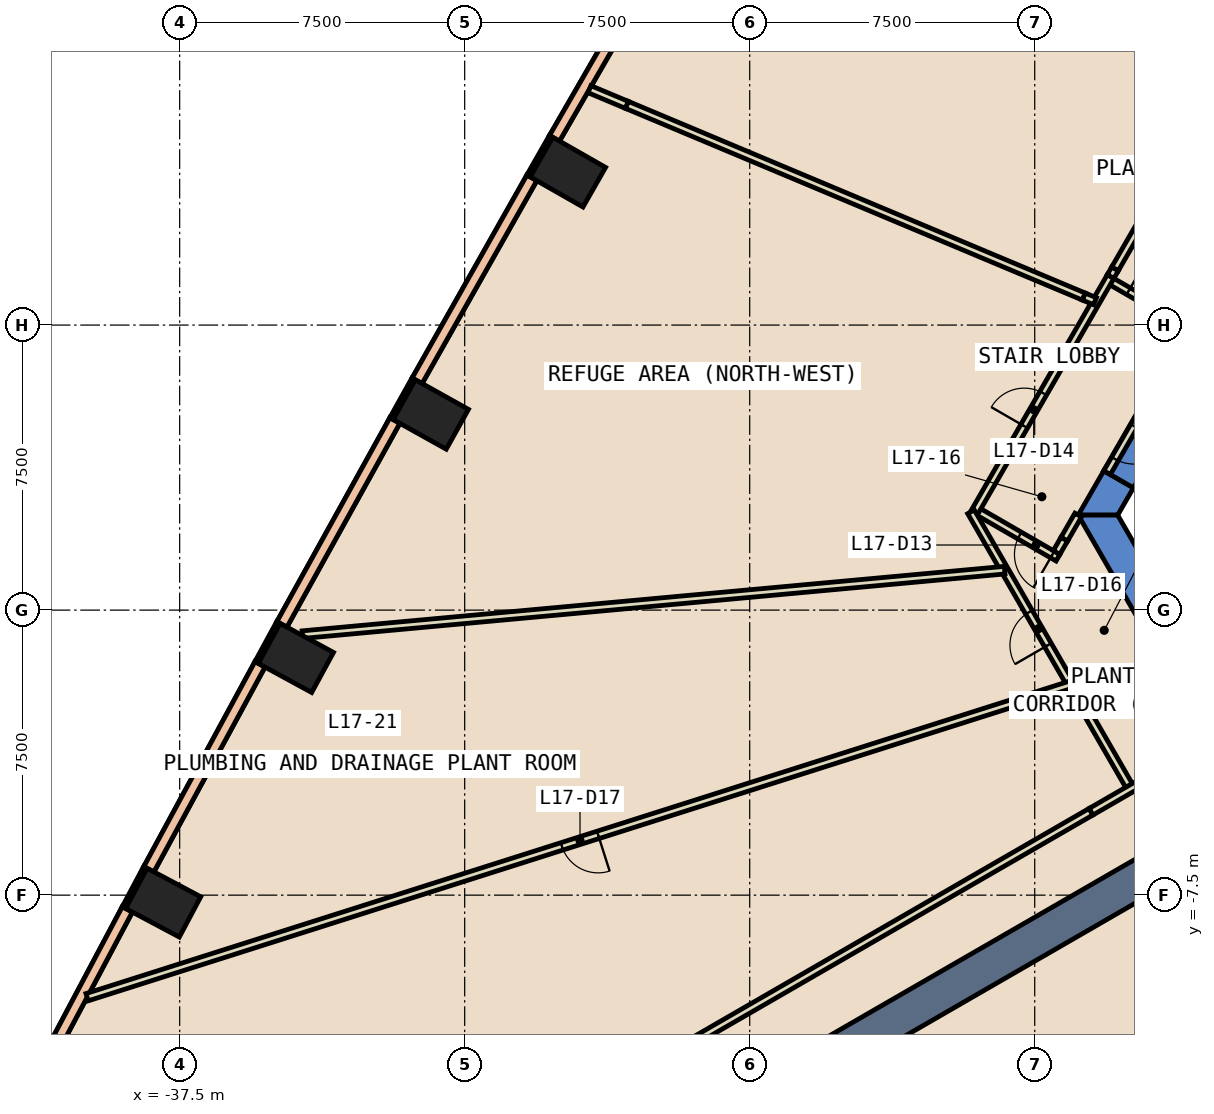
"""IFC4 building model, lengths in metres.
Left out: names, types, materials, properties, quantities, classifications, styles, units other than length and angle.
Written with IfcOpenShell. Run it as: python <this file> out.ifc"""

import sys

from ifc_helpers import new_model, si_unit, direction, frame, frame_2d, origin, origin_2d, place, context, subcontext, project, spatial, polyline, rectangle, outline, extrude, element, fill, save


model = new_model("IFC4")
c1 = context("Model", 3, precision=1e-05, world=origin(), true_north=direction((0.0, 1.0)))
c2 = subcontext(c1, "Body", "Model", "MODEL_VIEW")
j1 = project(units=[si_unit("LENGTHUNIT", "METRE"), si_unit("PLANEANGLEUNIT", "RADIAN")], contexts=[c1])
p1 = place(None, origin())
s1 = spatial("IfcSite", under=j1, at=p1, CompositionType="ELEMENT")
p2 = place(p1, origin())
s2 = spatial("IfcBuilding", under=s1, at=p2, CompositionType="ELEMENT")
p3 = place(p2, frame((0.0, 0.0, 81.2)))
s3 = spatial("IfcBuildingStorey", under=s2, at=p3, CompositionType="ELEMENT", Elevation=81.2)
for number, where, z_axis, x_axis in (
    (1, (-27.285, 11.524, -0.6), (0.0, 0.0, 1.0), (0.496, 0.869, 0.0)),
    (2, (-30.892, 5.148, -0.6), (0.0, 0.0, 1.0), (0.487, 0.873, 0.0)),
    (3, (-34.442, -1.258, -0.6), (0.0, 0.0, 1.0), (0.478, 0.878, 0.0)),
    (4, (-37.934, -7.697, -0.6), (0.0, 0.0, 1.0), (0.469, 0.883, 0.0)),
):
    element("IfcColumn", number, at=place(p3, frame(where, z_axis=z_axis, x_axis=x_axis)), inside=s3, PredefinedType="COLUMN", context=c2, shape_type="SweptSolid", body=[
        extrude(rectangle(XDim=1.2, YDim=1.6, at=origin_2d()), origin(), (0.0, 0.0, 1.0), 5.4),
    ])
p4 = place(p3, frame((0.0, 0.0, -0.6)))
e5 = element("IfcWall", 5, at=p4, inside=s3, PredefinedType="SHEAR", context=c2, shape_type="SweptSolid", body=[
    extrude(outline(polyline([(-12.403, 3.217), (-13.182, 3.667), (-13.856, 2.5), (-12.817, 2.5), (-12.403, 3.217)])), origin(), (0.0, 0.0, 1.0), 5.4),
])
p5 = place(p3, frame((0.0, 0.0, 3.6)))
e6 = element("IfcWall", 6, at=p5, inside=s3, PredefinedType="SHEAR", context=c2, shape_type="SweptSolid", body=[
    extrude(outline(polyline([(-13.182, 3.667), (-12.403, 3.217), (-11.488, 4.802), (-12.267, 5.252), (-13.182, 3.667)])), origin(), (0.0, 0.0, 1.0), 1.2),
])
p6 = place(p3, frame((0.0, 0.0, -0.6)))
e7 = element("IfcWall", 7, at=p6, inside=s3, PredefinedType="SHEAR", context=c2, shape_type="SweptSolid", body=[
    extrude(outline(polyline([(-13.856, 2.5), (-6.928, -9.5), (-6.409, -8.6), (-12.817, 2.5), (-13.856, 2.5)])), origin(), (0.0, 0.0, 1.0), 5.4),
])
p7 = place(p3, frame((-9.31, -5.375, 0.0), z_axis=(0.0, 0.0, 1.0), x_axis=(-0.866022967049, -0.500004220526, 0.0)))
e8 = element("IfcWall", 8, at=p7, inside=s3, PredefinedType="SHEAR", context=c2, shape_type="SweptSolid", body=[
    extrude(rectangle(XDim=35.802, YDim=1.0, at=frame_2d((17.901, 0.0))), origin(), (0.0, 0.0, 1.0), 4.8),
])
p8 = place(p3, frame((-27.726, 12.466, 0.0), z_axis=(0.0, 0.0, 1.0), x_axis=(-0.495854054996, -0.868405870629, 0.0)))
e9 = element("IfcWall", 9, at=p8, inside=s3, PredefinedType="STANDARD", context=c2, shape_type="SweptSolid", body=[
    extrude(rectangle(XDim=1.2, YDim=0.1, at=frame_2d((0.6, 0.0))), origin(), (0.0, 0.0, 1.0), 4.8),
])
p9 = place(p3, frame((-31.342, 6.086, 0.0), z_axis=(0.0, 0.0, 1.0), x_axis=(-0.486817526853, -0.873503689488, 0.0)))
e10 = element("IfcWall", 10, at=p9, inside=s3, PredefinedType="STANDARD", context=c2, shape_type="SweptSolid", body=[
    extrude(rectangle(XDim=1.2, YDim=0.1, at=frame_2d((0.6, 0.0))), origin(), (0.0, 0.0, 1.0), 4.8),
])
p10 = place(p3, frame((-34.901, -0.325, 0.0), z_axis=(0.0, 0.0, 1.0), x_axis=(-0.478424520456, -0.878128679765, 0.0)))
e11 = element("IfcWall", 11, at=p10, inside=s3, PredefinedType="STANDARD", context=c2, shape_type="SweptSolid", body=[
    extrude(rectangle(XDim=1.2, YDim=0.1, at=frame_2d((0.6, 0.0))), origin(), (0.0, 0.0, 1.0), 4.8),
])
p11 = place(p3, frame((-38.403, -6.769, 0.0), z_axis=(0.0, 0.0, 1.0), x_axis=(-0.469467784567, -0.882949601763, 0.0)))
e12 = element("IfcWall", 12, at=p11, inside=s3, PredefinedType="STANDARD", context=c2, shape_type="SweptSolid", body=[
    extrude(rectangle(XDim=1.199, YDim=0.1, at=frame_2d((0.6, 0.0))), origin(), (0.0, 0.0, 1.0), 4.8),
])
p12 = place(p3, frame((-24.57, 17.727, 0.0), z_axis=(0.0, 0.0, 1.0), x_axis=(-0.499931451131, -0.866064976875, 0.0)))
e13 = element("IfcWall", 13, at=p12, inside=s3, PredefinedType="STANDARD", context=c2, shape_type="SweptSolid", body=[
    extrude(rectangle(XDim=6.135, YDim=0.3, at=frame_2d((3.067, 0.0))), origin(), (0.0, 0.0, 1.0), 1.2),
])
p13 = place(p3, frame((-24.57, 17.727, 4.0), z_axis=(0.0, 0.0, 1.0), x_axis=(-0.499931451131, -0.866064976875, 0.0)))
e14 = element("IfcWall", 14, at=p13, inside=s3, PredefinedType="STANDARD", context=c2, shape_type="SweptSolid", body=[
    extrude(rectangle(XDim=6.135, YDim=0.3, at=frame_2d((3.067, 0.0))), origin(), (0.0, 0.0, 1.0), 0.8),
])
p14 = place(p3, frame((-28.232, 11.374, 0.0), z_axis=(0.0, 0.0, 1.0), x_axis=(-0.492268362752, -0.870443484112, 0.0)))
e15 = element("IfcWall", 15, at=p14, inside=s3, PredefinedType="STANDARD", context=c2, shape_type="SweptSolid", body=[
    extrude(rectangle(XDim=6.135, YDim=0.3, at=frame_2d((3.067, 0.0))), origin(), (0.0, 0.0, 1.0), 1.2),
])
p15 = place(p3, frame((-28.232, 11.374, 4.0), z_axis=(0.0, 0.0, 1.0), x_axis=(-0.492268362752, -0.870443484112, 0.0)))
e16 = element("IfcWall", 16, at=p15, inside=s3, PredefinedType="STANDARD", context=c2, shape_type="SweptSolid", body=[
    extrude(rectangle(XDim=6.135, YDim=0.3, at=frame_2d((3.067, 0.0))), origin(), (0.0, 0.0, 1.0), 0.8),
])
p16 = place(p3, frame((-31.837, 4.989, 0.0), z_axis=(0.0, 0.0, 1.0), x_axis=(-0.484720058863, -0.87466934583, 0.0)))
e17 = element("IfcWall", 17, at=p16, inside=s3, PredefinedType="STANDARD", context=c2, shape_type="SweptSolid", body=[
    extrude(rectangle(XDim=6.134, YDim=0.3, at=frame_2d((3.067, 0.0))), origin(), (0.0, 0.0, 1.0), 1.2),
])
p17 = place(p3, frame((-31.837, 4.989, 4.0), z_axis=(0.0, 0.0, 1.0), x_axis=(-0.484720058863, -0.87466934583, 0.0)))
e18 = element("IfcWall", 18, at=p17, inside=s3, PredefinedType="STANDARD", context=c2, shape_type="SweptSolid", body=[
    extrude(rectangle(XDim=6.134, YDim=0.3, at=frame_2d((3.067, 0.0))), origin(), (0.0, 0.0, 1.0), 0.8),
])
p18 = place(p3, frame((-35.386, -1.426, 0.0), z_axis=(0.0, 0.0, 1.0), x_axis=(-0.476762519224, -0.879032138356, 0.0)))
e19 = element("IfcWall", 19, at=p18, inside=s3, PredefinedType="STANDARD", context=c2, shape_type="SweptSolid", body=[
    extrude(rectangle(XDim=6.135, YDim=0.3, at=frame_2d((3.068, 0.0))), origin(), (0.0, 0.0, 1.0), 1.2),
])
p19 = place(p3, frame((-35.386, -1.426, 4.0), z_axis=(0.0, 0.0, 1.0), x_axis=(-0.476762519224, -0.879032138356, 0.0)))
e20 = element("IfcWall", 20, at=p19, inside=s3, PredefinedType="STANDARD", context=c2, shape_type="SweptSolid", body=[
    extrude(rectangle(XDim=6.135, YDim=0.3, at=frame_2d((3.068, 0.0))), origin(), (0.0, 0.0, 1.0), 0.8),
])
p20 = place(p3, frame((-38.877, -7.874, 0.0), z_axis=(0.0, 0.0, 1.0), x_axis=(-0.469082096551, -0.883154565575, 0.0)))
e21 = element("IfcWall", 21, at=p20, inside=s3, PredefinedType="STANDARD", context=c2, shape_type="SweptSolid", body=[
    extrude(rectangle(XDim=6.346, YDim=0.3, at=frame_2d((3.173, 0.0))), origin(), (0.0, 0.0, 1.0), 1.2),
])
p21 = place(p3, frame((-38.877, -7.874, 4.0), z_axis=(0.0, 0.0, 1.0), x_axis=(-0.469082096551, -0.883154565575, 0.0)))
e22 = element("IfcWall", 22, at=p21, inside=s3, PredefinedType="STANDARD", context=c2, shape_type="SweptSolid", body=[
    extrude(rectangle(XDim=6.346, YDim=0.3, at=frame_2d((3.173, 0.0))), origin(), (0.0, 0.0, 1.0), 0.8),
])
p22 = place(p3, frame((-43.337, -22.52, 0.0), z_axis=(0.0, 0.0, 1.0), x_axis=(0.866035864772, 0.4999818806, 0.0)))
e23 = element("IfcWall", 23, at=p22, inside=s3, PredefinedType="PARTITIONING", context=c2, shape_type="SweptSolid", body=[
    extrude(rectangle(XDim=34.431, YDim=0.2, at=frame_2d((17.216, 0.0))), origin(), (0.0, 0.0, 1.0), 4.8),
])
p23 = place(p3, frame((-13.053, 8.691, 0.0), z_axis=(0.0, 0.0, 1.0), x_axis=(0.865973769406, -0.500089422704, 0.0)))
e24 = element("IfcWall", 24, at=p23, inside=s3, PredefinedType="PARTITIONING", context=c2, shape_type="SweptSolid", body=[
    extrude(rectangle(XDim=2.399, YDim=0.2, at=frame_2d((1.2, 0.0))), origin(), (0.0, 0.0, 1.0), 2.4),
])
p24 = place(p23, frame((0.6, 0.0, 0.0)))
e25 = element("IfcOpeningElement", 25, at=p24, cuts=e24, PredefinedType="OPENING", context=c2, shape_type="SweptSolid", body=[
    extrude(rectangle(XDim=1.0, YDim=2.1, at=frame_2d((0.5, 1.05))), frame((0.0, 0.11, 0.0), z_axis=(0.0, -1.0, 0.0), x_axis=(1.0, 0.0, 0.0)), (0.0, 0.0, 1.0), 0.22),
])
p25 = place(p3, frame((-13.856, 2.501, 0.0), z_axis=(0.0, 0.0, 1.0), x_axis=(-0.500327511442, -0.865836232376, 0.0)))
e26 = element("IfcWall", 26, at=p25, inside=s3, PredefinedType="PARTITIONING", context=c2, shape_type="SweptSolid", body=[
    extrude(rectangle(XDim=0.733, YDim=0.2, at=frame_2d((0.367, 0.0))), origin(), (0.0, 0.0, 1.0), 4.8),
])
p26 = place(p3, frame((-14.388, 1.379, 0.0), z_axis=(0.0, 0.0, 1.0), x_axis=(-0.866022959057, 0.500004234368, 0.0)))
e27 = element("IfcWall", 27, at=p26, inside=s3, PredefinedType="PARTITIONING", context=c2, shape_type="SweptSolid", body=[
    extrude(rectangle(XDim=2.5, YDim=0.2, at=frame_2d((1.25, 0.0))), origin(), (0.0, 0.0, 1.0), 4.8),
])
p27 = place(p26, frame((0.168, 0.0, 0.0)))
e28 = element("IfcOpeningElement", 28, at=p27, cuts=e27, PredefinedType="OPENING", context=c2, shape_type="SweptSolid", body=[
    extrude(rectangle(XDim=1.0, YDim=2.1, at=frame_2d((0.5, 1.05))), frame((0.0, 0.11, 0.0), z_axis=(0.0, -1.0, 0.0), x_axis=(1.0, 0.0, 0.0)), (0.0, 0.0, 1.0), 0.22),
])
p28 = place(p3, frame((-16.603, 2.542, 0.0), z_axis=(0.0, 0.0, 1.0), x_axis=(0.499968011863, 0.866043871356, 0.0)))
e29 = element("IfcWall", 29, at=p28, inside=s3, PredefinedType="PARTITIONING", context=c2, shape_type="SweptSolid", body=[
    extrude(rectangle(XDim=7.201, YDim=0.2, at=frame_2d((3.6, 0.0))), origin(), (0.0, 0.0, 1.0), 4.8),
])
p29 = place(p28, frame((2.654, 0.0, 0.0)))
e30 = element("IfcOpeningElement", 30, at=p29, cuts=e29, PredefinedType="OPENING", context=c2, shape_type="SweptSolid", body=[
    extrude(rectangle(XDim=1.0, YDim=2.1, at=frame_2d((0.5, 1.05))), frame((0.0, 0.11, 0.0), z_axis=(0.0, -1.0, 0.0), x_axis=(1.0, 0.0, 0.0)), (0.0, 0.0, 1.0), 0.22),
])
p30 = place(p3, frame((-13.003, 8.778, 0.0), z_axis=(0.0, 0.0, 1.0), x_axis=(0.49939147885, 0.866376448694, 0.0)))
e31 = element("IfcWall", 31, at=p30, inside=s3, PredefinedType="PARTITIONING", context=c2, shape_type="SweptSolid", body=[
    extrude(rectangle(XDim=0.234, YDim=0.2, at=frame_2d((0.117, 0.0))), origin(), (0.0, 0.0, 1.0), 2.4),
])
p31 = place(p3, frame((-12.471, -4.7, 0.0), z_axis=(0.0, 0.0, 1.0), x_axis=(-0.49990916997, 0.866077838176, 0.0)))
e32 = element("IfcWall", 32, at=p31, inside=s3, PredefinedType="PARTITIONING", context=c2, shape_type="SweptSolid", body=[
    extrude(rectangle(XDim=8.414, YDim=0.2, at=frame_2d((4.207, 0.0))), origin(), (0.0, 0.0, 1.0), 4.8),
])
p32 = place(p31, frame((4.362, 0.0, 0.0)))
e33 = element("IfcOpeningElement", 33, at=p32, cuts=e32, PredefinedType="OPENING", context=c2, shape_type="SweptSolid", body=[
    extrude(rectangle(XDim=1.0, YDim=2.1, at=frame_2d((0.5, 1.05))), frame((0.0, 0.11, 0.0), z_axis=(0.0, -1.0, 0.0), x_axis=(1.0, 0.0, 0.0)), (0.0, 0.0, 1.0), 0.22),
])
p33 = place(p3, frame((-26.717, 13.707, 0.0), z_axis=(0.0, 0.0, 1.0), x_axis=(0.922149767817, -0.386833046307, 0.0)))
e34 = element("IfcWall", 34, at=p33, inside=s3, PredefinedType="PARTITIONING", context=c2, shape_type="SweptSolid", body=[
    extrude(rectangle(XDim=1.07, YDim=0.2, at=frame_2d((0.535, 0.0))), origin(), (0.0, 0.0, 1.0), 2.4),
])
p34 = place(p3, frame((-15.791, 1.051, 0.0), z_axis=(0.0, 0.0, 1.0), x_axis=(-0.99580964223, -0.091450294928, 0.0)))
e35 = element("IfcWall", 35, at=p34, inside=s3, PredefinedType="PARTITIONING", context=c2, shape_type="SweptSolid", body=[
    extrude(rectangle(XDim=18.557, YDim=0.2, at=frame_2d((9.278, 0.0))), origin(), (0.0, 0.0, 1.0), 2.4),
])
p35 = place(p3, frame((-14.051, -1.963, 0.0), z_axis=(0.0, 0.0, 1.0), x_axis=(-0.953071002878, -0.302746863687, 0.0)))
e36 = element("IfcWall", 36, at=p35, inside=s3, PredefinedType="PARTITIONING", context=c2, shape_type="SweptSolid", body=[
    extrude(rectangle(XDim=27.158, YDim=0.2, at=frame_2d((13.579, 0.0))), origin(), (0.0, 0.0, 1.0), 4.8),
])
p36 = place(p35, frame((13.05, 0.0, 0.0)))
e37 = element("IfcOpeningElement", 37, at=p36, cuts=e36, PredefinedType="OPENING", context=c2, shape_type="SweptSolid", body=[
    extrude(rectangle(XDim=1.0, YDim=2.1, at=frame_2d((0.5, 1.05))), frame((0.0, 0.11, 0.0), z_axis=(0.0, -1.0, 0.0), x_axis=(1.0, 0.0, 0.0)), (0.0, 0.0, 1.0), 0.22),
])
p37 = place(p3, frame((-12.181, 5.202, 0.0), z_axis=(0.0, 0.0, 1.0), x_axis=(-0.500215337403, -0.865901042976, 0.0)))
e38 = element("IfcWall", 38, at=p37, inside=s3, PredefinedType="PARTITIONING", context=c2, shape_type="SweptSolid", body=[
    extrude(rectangle(XDim=1.829, YDim=0.2, at=frame_2d((0.915, 0.0))), origin(), (0.0, 0.0, 1.0), 2.4),
])
p38 = place(p37, frame((0.415, 0.0, 0.0)))
e39 = element("IfcOpeningElement", 39, at=p38, cuts=e38, PredefinedType="OPENING", context=c2, shape_type="SweptSolid", body=[
    extrude(rectangle(XDim=1.0, YDim=2.1, at=frame_2d((0.5, 1.05))), frame((0.0, 0.11, 0.0), z_axis=(0.0, -1.0, 0.0), x_axis=(1.0, 0.0, 0.0)), (0.0, 0.0, 1.0), 0.22),
])
p39 = place(p3, frame((-10.659, -3.654, 0.0), z_axis=(0.0, 0.0, 1.0), x_axis=(-0.866004557827, -0.500036104519, 0.0)))
e40 = element("IfcWall", 40, at=p39, inside=s3, PredefinedType="PARTITIONING", context=c2, shape_type="SweptSolid", body=[
    extrude(rectangle(XDim=3.302, YDim=0.2, at=frame_2d((1.651, 0.0))), origin(), (0.0, 0.0, 1.0), 4.8),
])
p40 = place(p3, frame((-14.223, 1.866, 0.0), z_axis=(0.0, 0.0, 1.0), x_axis=(-0.500297731093, -0.865853440406, 0.0)))
e41 = element("IfcWall", 41, at=p40, inside=s3, PredefinedType="PARTITIONING", context=c2, shape_type="SweptSolid", body=[
    extrude(rectangle(XDim=0.404, YDim=0.2, at=frame_2d((0.202, 0.0))), origin(), (0.0, 0.0, 1.0), 2.4),
])
p41 = place(p3, frame((-12.886, 8.981, 0.0), z_axis=(0.0, 0.0, 1.0), x_axis=(0.500018952895, 0.866014461049, 0.0)))
e42 = element("IfcWall", 42, at=p41, inside=s3, PredefinedType="PARTITIONING", context=c2, shape_type="SweptSolid", body=[
    extrude(rectangle(XDim=3.35, YDim=0.2, at=frame_2d((1.675, 0.0))), origin(), (0.0, 0.0, 1.0), 4.8),
])
p42 = place(p3, frame((-25.73, 13.293, 0.0), z_axis=(0.0, 0.0, 1.0), x_axis=(0.922164650021, -0.386797567535, 0.0)))
e43 = element("IfcWall", 43, at=p42, inside=s3, PredefinedType="PARTITIONING", context=c2, shape_type="SweptSolid", body=[
    extrude(rectangle(XDim=13.038, YDim=0.2, at=frame_2d((6.519, 0.0))), origin(), (0.0, 0.0, 1.0), 4.8),
])
p43 = place(p3, frame((-13.707, 8.25, 0.0), z_axis=(0.0, 0.0, 1.0), x_axis=(0.921982105607, -0.387232484355, 0.0)))
e44 = element("IfcWall", 44, at=p43, inside=s3, PredefinedType="PARTITIONING", context=c2, shape_type="SweptSolid", body=[
    extrude(rectangle(XDim=0.318, YDim=0.2, at=frame_2d((0.159, 0.0))), origin(), (0.0, 0.0, 1.0), 2.4),
])
p44 = place(p24, origin())
e45 = element("IfcDoor", 45, at=p44, inside=s3, OperationType="SINGLE_SWING_RIGHT", PredefinedType="DOOR", context=c2, shape_type="SweptSolid", body=[
    extrude(rectangle(XDim=1.0, YDim=2.1, at=frame_2d((0.5, 1.05))), frame((0.0, 0.025, 0.0), z_axis=(0.0, -1.0, 0.0), x_axis=(1.0, 0.0, 0.0)), (0.0, 0.0, 1.0), 0.05),
])
fill(e25, e45)
p45 = place(p27, origin())
e46 = element("IfcDoor", 46, at=p45, inside=s3, OperationType="SINGLE_SWING_LEFT", PredefinedType="DOOR", context=c2, shape_type="SweptSolid", body=[
    extrude(rectangle(XDim=1.0, YDim=2.1, at=frame_2d((0.5, 1.05))), frame((0.0, 0.025, 0.0), z_axis=(0.0, -1.0, 0.0), x_axis=(1.0, 0.0, 0.0)), (0.0, 0.0, 1.0), 0.05),
])
fill(e28, e46)
p46 = place(p29, origin())
e47 = element("IfcDoor", 47, at=p46, inside=s3, OperationType="SINGLE_SWING_RIGHT", PredefinedType="DOOR", context=c2, shape_type="SweptSolid", body=[
    extrude(rectangle(XDim=1.0, YDim=2.1, at=frame_2d((0.5, 1.05))), frame((0.0, 0.025, 0.0), z_axis=(0.0, -1.0, 0.0), x_axis=(1.0, 0.0, 0.0)), (0.0, 0.0, 1.0), 0.05),
])
fill(e30, e47)
p47 = place(p32, origin())
e48 = element("IfcDoor", 48, at=p47, inside=s3, OperationType="SINGLE_SWING_RIGHT", PredefinedType="DOOR", context=c2, shape_type="SweptSolid", body=[
    extrude(rectangle(XDim=1.0, YDim=2.1, at=frame_2d((0.5, 1.05))), frame((0.0, 0.025, 0.0), z_axis=(0.0, -1.0, 0.0), x_axis=(1.0, 0.0, 0.0)), (0.0, 0.0, 1.0), 0.05),
])
fill(e33, e48)
p48 = place(p36, origin())
e49 = element("IfcDoor", 49, at=p48, inside=s3, OperationType="SINGLE_SWING_LEFT", PredefinedType="DOOR", context=c2, shape_type="SweptSolid", body=[
    extrude(rectangle(XDim=1.0, YDim=2.1, at=frame_2d((0.5, 1.05))), frame((0.0, 0.025, 0.0), z_axis=(0.0, -1.0, 0.0), x_axis=(1.0, 0.0, 0.0)), (0.0, 0.0, 1.0), 0.05),
])
fill(e37, e49)
p49 = place(p38, origin())
e50 = element("IfcDoor", 50, at=p49, inside=s3, OperationType="SINGLE_SWING_LEFT", PredefinedType="DOOR", context=c2, shape_type="SweptSolid", body=[
    extrude(rectangle(XDim=1.0, YDim=2.1, at=frame_2d((0.5, 1.05))), frame((0.0, 0.025, 0.0), z_axis=(0.0, -1.0, 0.0), x_axis=(1.0, 0.0, 0.0)), (0.0, 0.0, 1.0), 0.05),
])
fill(e39, e50)
save(model, sys.argv[1])
